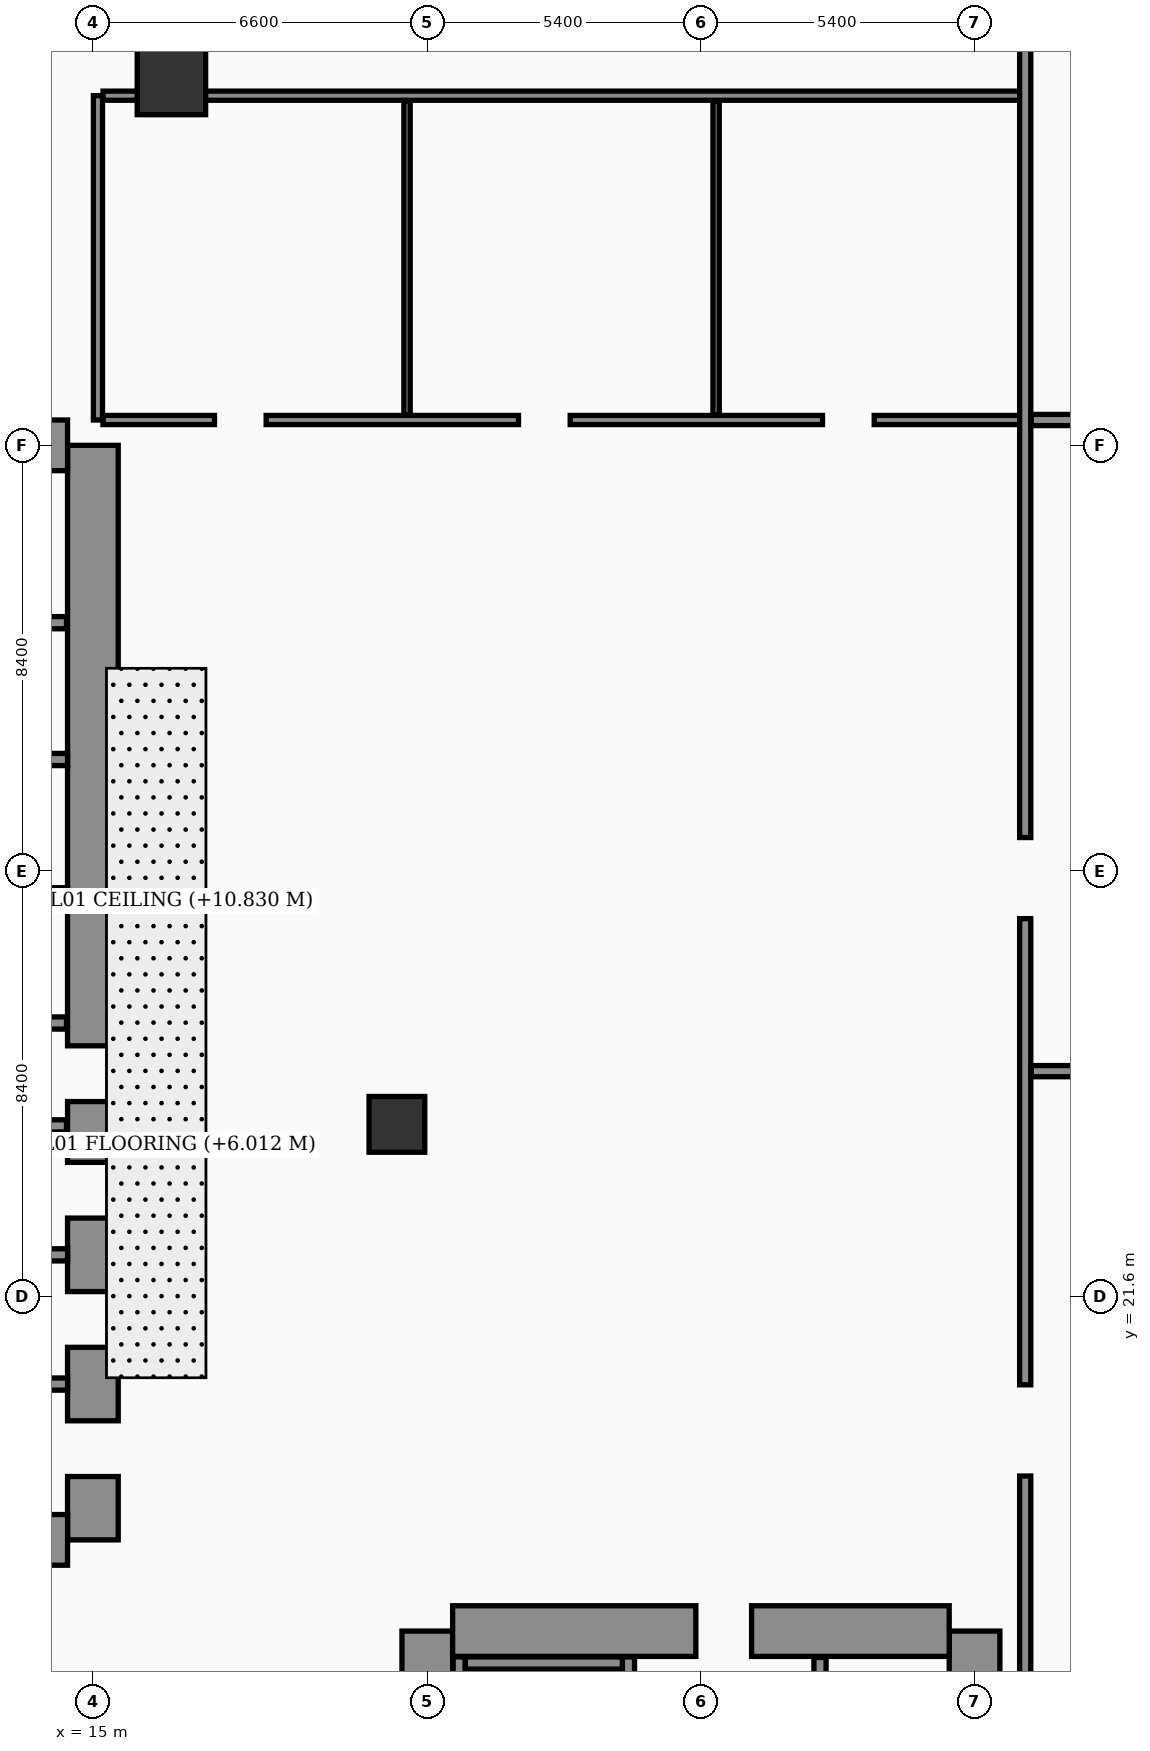
"""IFC4 building model, lengths in metres.
Left out: names, types, materials, properties, quantities, classifications, styles, units other than length and angle.
Written with IfcOpenShell. Run it as: python <this file> out.ifc"""

import sys

from ifc_helpers import new_model, si_unit, direction, frame, frame_2d, origin, origin_2d, place, context, subcontext, project, spatial, rectangle, hollow_rectangle, extrude, element, fill, save


model = new_model("IFC4")
c1 = context("Model", 3, precision=1e-05, world=origin(), true_north=direction((0.0, 1.0)))
c2 = subcontext(c1, "Body", "Model", "MODEL_VIEW")
j1 = project(units=[si_unit("LENGTHUNIT", "METRE"), si_unit("PLANEANGLEUNIT", "RADIAN")], contexts=[c1])
p1 = place(None, origin())
s1 = spatial("IfcSite", under=j1, at=p1, CompositionType="ELEMENT")
p2 = place(p1, origin())
s2 = spatial("IfcBuilding", under=s1, at=p2, CompositionType="ELEMENT")
p3 = place(p2, frame((0.0, 0.0, 6.0)))
s3 = spatial("IfcBuildingStorey", under=s2, at=p3, CompositionType="ELEMENT", Elevation=6.0)
p4 = place(p3, frame((15.0, 16.8, 0.0), z_axis=(0.0, 0.0, 1.0), x_axis=(0.0, 1.0, 0.0)))
e1 = element("IfcWall", 1, at=p4, inside=s3, PredefinedType="SHEAR", context=c2, shape_type="SweptSolid", body=[
    extrude(rectangle(XDim=21.6, YDim=1.0, at=frame_2d((10.8, 0.0))), origin(), (0.0, 0.0, 1.0), 5.68),
])
p5 = place(p4, frame((8.65, 0.0, 0.0)))
e2 = element("IfcOpeningElement", 2, at=p5, cuts=e1, PredefinedType="OPENING", context=c2, shape_type="SweptSolid", body=[
    extrude(rectangle(XDim=1.1, YDim=2.2, at=frame_2d((0.55, 1.1))), frame((0.0, 0.51, 0.0), z_axis=(0.0, -1.0, 0.0), x_axis=(1.0, 0.0, 0.0)), (0.0, 0.0, 1.0), 1.02),
])
p6 = place(p4, frame((1.25, 0.0, 0.0)))
e3 = element("IfcOpeningElement", 3, at=p6, cuts=e1, PredefinedType="OPENING", context=c2, shape_type="SweptSolid", body=[
    extrude(rectangle(XDim=1.1, YDim=2.2, at=frame_2d((0.55, 1.1))), frame((0.0, 0.51, 0.0), z_axis=(0.0, -1.0, 0.0), x_axis=(1.0, 0.0, 0.0)), (0.0, 0.0, 1.0), 1.02),
])
p7 = place(p4, frame((3.8, 0.0, 0.0)))
e4 = element("IfcOpeningElement", 4, at=p7, cuts=e1, PredefinedType="OPENING", context=c2, shape_type="SweptSolid", body=[
    extrude(rectangle(XDim=1.1, YDim=2.2, at=frame_2d((0.55, 1.1))), frame((0.0, 0.51, 0.0), z_axis=(0.0, -1.0, 0.0), x_axis=(1.0, 0.0, 0.0)), (0.0, 0.0, 1.0), 1.02),
])
p8 = place(p4, frame((6.35, 0.0, 0.0)))
e5 = element("IfcOpeningElement", 5, at=p8, cuts=e1, PredefinedType="OPENING", context=c2, shape_type="SweptSolid", body=[
    extrude(rectangle(XDim=1.1, YDim=2.2, at=frame_2d((0.55, 1.1))), frame((0.0, 0.51, 0.0), z_axis=(0.0, -1.0, 0.0), x_axis=(1.0, 0.0, 0.0)), (0.0, 0.0, 1.0), 1.02),
])
for number, where, z_axis, x_axis in (
    (6, (4.7, 38.4, 0.0), (0.0, 0.0, 1.0), (1.0, 0.0, 0.0)),
    (7, (4.7, 16.8, 0.0), (0.0, 0.0, 1.0), (1.0, 0.0, 0.0)),
):
    element("IfcWall", number, at=place(p3, frame(where, z_axis=z_axis, x_axis=x_axis)), inside=s3, PredefinedType="SHEAR", context=c2, shape_type="SweptSolid", body=[
        extrude(rectangle(XDim=9.8, YDim=1.0, at=frame_2d((4.9, 0.0))), origin(), (0.0, 0.0, 1.0), 5.68),
    ])
for number, where, z_axis, x_axis in (
    (8, (21.6, 4.6, 0.0), (0.0, 0.0, 1.0), (0.0, 1.0, 0.0)),
    (9, (32.4, 4.6, 0.0), (0.0, 0.0, 1.0), (0.0, 1.0, 0.0)),
):
    element("IfcWall", number, at=place(p3, frame(where, z_axis=z_axis, x_axis=x_axis)), inside=s3, PredefinedType="SHEAR", context=c2, shape_type="SweptSolid", body=[
        extrude(rectangle(XDim=10.4, YDim=1.0, at=frame_2d((5.2, 0.0))), origin(), (0.0, 0.0, 1.0), 5.68),
    ])
p9 = place(p3, frame((22.1, 15.0, 0.0), z_axis=(0.0, 0.0, 1.0), x_axis=(1.0, 0.0, 0.0)))
e10 = element("IfcWall", 10, at=p9, inside=s3, PredefinedType="SHEAR", context=c2, shape_type="SweptSolid", body=[
    extrude(rectangle(XDim=9.8, YDim=1.0, at=frame_2d((4.9, 0.0))), origin(), (0.0, 0.0, 1.0), 5.68),
])
p10 = place(p9, frame((4.8, 0.0, 0.0)))
e11 = element("IfcOpeningElement", 11, at=p10, cuts=e10, PredefinedType="OPENING", context=c2, shape_type="SweptSolid", body=[
    extrude(rectangle(XDim=1.1, YDim=2.2, at=frame_2d((0.55, 1.1))), frame((0.0, 0.51, 0.0), z_axis=(0.0, -1.0, 0.0), x_axis=(1.0, 0.0, 0.0)), (0.0, 0.0, 1.0), 1.02),
])
p11 = place(p3, frame((22.23, 5.1, 0.0), z_axis=(0.0, 0.0, 1.0), x_axis=(0.0, 1.0, 0.0)))
e12 = element("IfcWall", 12, at=p11, inside=s3, PredefinedType="SOLIDWALL", context=c2, shape_type="SweptSolid", body=[
    extrude(rectangle(XDim=9.39, YDim=0.24, at=frame_2d((4.695, 0.0))), origin(), (0.0, 0.0, 1.0), 5.68),
])
p12 = place(p3, frame((25.57, 5.1, 0.0), z_axis=(0.0, 0.0, 1.0), x_axis=(0.0, 1.0, 0.0)))
e13 = element("IfcWall", 13, at=p12, inside=s3, PredefinedType="SOLIDWALL", context=c2, shape_type="SweptSolid", body=[
    extrude(rectangle(XDim=9.39, YDim=0.24, at=frame_2d((4.695, 0.0))), origin(), (0.0, 0.0, 1.0), 5.68),
])
p13 = place(p12, frame((0.35, 0.0, 0.0)))
e14 = element("IfcOpeningElement", 14, at=p13, cuts=e13, PredefinedType="OPENING", context=c2, shape_type="SweptSolid", body=[
    extrude(rectangle(XDim=1.15, YDim=2.2, at=frame_2d((0.575, 1.1))), frame((0.0, 0.13, 0.0), z_axis=(0.0, -1.0, 0.0), x_axis=(1.0, 0.0, 0.0)), (0.0, 0.0, 1.0), 0.26),
])
p14 = place(p3, frame((22.35, 14.37, 0.0), z_axis=(0.0, 0.0, 1.0), x_axis=(1.0, 0.0, 0.0)))
e15 = element("IfcWall", 15, at=p14, inside=s3, PredefinedType="SOLIDWALL", context=c2, shape_type="SweptSolid", body=[
    extrude(rectangle(XDim=3.1, YDim=0.24, at=frame_2d((1.55, 0.0))), origin(), (0.0, 0.0, 1.0), 5.68),
])
for number, where, z_axis, x_axis in (
    (16, (12.18, 19.875, 0.0), (0.0, 0.0, 1.0), (1.0, 0.0, 0.0)),
    (17, (12.18, 22.425, 0.0), (0.0, 0.0, 1.0), (1.0, 0.0, 0.0)),
    (18, (12.18, 29.55, 0.0), (0.0, 0.0, 1.0), (1.0, 0.0, 0.0)),
    (19, (12.18, 32.2, 0.0), (0.0, 0.0, 1.0), (1.0, 0.0, 0.0)),
):
    element("IfcWall", number, at=place(p3, frame(where, z_axis=z_axis, x_axis=x_axis)), inside=s3, PredefinedType="SOLIDWALL", context=c2, shape_type="SweptSolid", body=[
        extrude(rectangle(XDim=2.32, YDim=0.24, at=frame_2d((1.16, 0.0))), origin(), (0.0, 0.0, 1.0), 5.68),
    ])
p15 = place(p3, frame((16.55, 45.6, 0.0), z_axis=(0.0, 0.0, 1.0), x_axis=(1.0, 0.0, 0.0)))
e20 = element("IfcColumn", 20, at=p15, inside=s3, PredefinedType="COLUMN", context=c2, shape_type="SweptSolid", body=[
    extrude(rectangle(XDim=1.35, YDim=1.35, at=origin_2d()), origin(), (0.0, 0.0, 1.0), 5.68),
])
p16 = place(p3, frame((21.0, 25.0, 0.0), z_axis=(0.0, 0.0, 1.0), x_axis=(1.0, 0.0, 0.0)))
e21 = element("IfcColumn", 21, at=p16, inside=s3, PredefinedType="COLUMN", context=c2, shape_type="SweptSolid", body=[
    extrude(hollow_rectangle(XDim=1.1, YDim=1.1, WallThickness=0.045, at=origin_2d()), origin(), (0.0, 0.0, 1.0), 5.68),
])
p17 = place(p3, frame((12.15, 24.97, 0.0), z_axis=(0.0, 0.0, 1.0), x_axis=(1.0, 0.0, 0.0)))
e22 = element("IfcWall", 22, at=p17, inside=s3, PredefinedType="SOLIDWALL", context=c2, shape_type="SweptSolid", body=[
    extrude(rectangle(XDim=2.33, YDim=0.24, at=frame_2d((1.165, 0.0))), origin(), (0.0, 0.0, 1.0), 4.88),
])
p18 = place(p3, frame((12.25, 27.0, 0.0), z_axis=(0.0, 0.0, 1.0), x_axis=(1.0, 0.0, 0.0)))
e23 = element("IfcWall", 23, at=p18, inside=s3, PredefinedType="SOLIDWALL", context=c2, shape_type="SweptSolid", body=[
    extrude(rectangle(XDim=2.23, YDim=0.24, at=frame_2d((1.115, 0.0))), origin(), (0.0, 0.0, 1.0), 5.68),
])
p19 = place(p3, frame((9.66, 34.9, 0.0), z_axis=(0.0, 0.0, 1.0), x_axis=(1.0, 0.0, 0.0)))
e24 = element("IfcWall", 24, at=p19, inside=s3, PredefinedType="SOLIDWALL", context=c2, shape_type="SweptSolid", body=[
    extrude(rectangle(XDim=4.82, YDim=0.24, at=frame_2d((2.41, 0.0))), origin(), (0.0, 0.0, 1.0), 5.68),
])
p20 = place(p3, frame((29.35, 5.12, 0.0), z_axis=(0.0, 0.0, 1.0), x_axis=(0.0, 1.0, 0.0)))
e25 = element("IfcWall", 25, at=p20, inside=s3, PredefinedType="SOLIDWALL", context=c2, shape_type="SweptSolid", body=[
    extrude(rectangle(XDim=9.36, YDim=0.24, at=frame_2d((4.68, 0.0))), origin(), (0.0, 0.0, 1.0), 5.68),
])
p21 = place(p20, frame((0.55, 0.0, 0.0)))
e26 = element("IfcOpeningElement", 26, at=p21, cuts=e25, PredefinedType="OPENING", context=c2, shape_type="SweptSolid", body=[
    extrude(rectangle(XDim=1.3, YDim=2.35, at=frame_2d((0.65, 1.175))), frame((0.0, 0.13, 0.0), z_axis=(0.0, -1.0, 0.0), x_axis=(1.0, 0.0, 0.0)), (0.0, 0.0, 1.0), 0.26),
])
p22 = place(p3, frame((15.2, 38.9, 0.0), z_axis=(0.0, 0.0, 1.0), x_axis=(1.0, 0.0, 0.0)))
e27 = element("IfcWall", 27, at=p22, inside=s3, PredefinedType="PARTITIONING", context=c2, shape_type="SweptSolid", body=[
    extrude(rectangle(XDim=18.1, YDim=0.18, at=frame_2d((9.05, 0.0))), origin(), (0.0, 0.0, 1.0), 4.88),
])
p23 = place(p22, frame((2.2, 0.0, 0.0)))
e28 = element("IfcOpeningElement", 28, at=p23, cuts=e27, PredefinedType="OPENING", context=c2, shape_type="SweptSolid", body=[
    extrude(rectangle(XDim=1.02, YDim=2.2, at=frame_2d((0.51, 1.1))), frame((0.0, 0.1, 0.0), z_axis=(0.0, -1.0, 0.0), x_axis=(1.0, 0.0, 0.0)), (0.0, 0.0, 1.0), 0.2),
])
p24 = place(p22, frame((8.2, 0.0, 0.0)))
e29 = element("IfcOpeningElement", 29, at=p24, cuts=e27, PredefinedType="OPENING", context=c2, shape_type="SweptSolid", body=[
    extrude(rectangle(XDim=1.02, YDim=2.2, at=frame_2d((0.51, 1.1))), frame((0.0, 0.1, 0.0), z_axis=(0.0, -1.0, 0.0), x_axis=(1.0, 0.0, 0.0)), (0.0, 0.0, 1.0), 0.2),
])
p25 = place(p22, frame((14.2, 0.0, 0.0)))
e30 = element("IfcOpeningElement", 30, at=p25, cuts=e27, PredefinedType="OPENING", context=c2, shape_type="SweptSolid", body=[
    extrude(rectangle(XDim=1.02, YDim=2.2, at=frame_2d((0.51, 1.1))), frame((0.0, 0.1, 0.0), z_axis=(0.0, -1.0, 0.0), x_axis=(1.0, 0.0, 0.0)), (0.0, 0.0, 1.0), 0.2),
])
p26 = place(p3, frame((15.2, 45.3, 0.0), z_axis=(0.0, 0.0, 1.0), x_axis=(1.0, 0.0, 0.0)))
e31 = element("IfcWall", 31, at=p26, inside=s3, PredefinedType="PARTITIONING", context=c2, shape_type="SweptSolid", body=[
    extrude(rectangle(XDim=18.1, YDim=0.18, at=frame_2d((9.05, 0.0))), origin(), (0.0, 0.0, 1.0), 4.88),
])
p27 = place(p3, frame((15.1, 38.9, 0.0), z_axis=(0.0, 0.0, 1.0), x_axis=(0.0, 1.0, 0.0)))
e32 = element("IfcWall", 32, at=p27, inside=s3, PredefinedType="PARTITIONING", context=c2, shape_type="SweptSolid", body=[
    extrude(rectangle(XDim=6.4, YDim=0.18, at=frame_2d((3.2, 0.0))), origin(), (0.0, 0.0, 1.0), 4.88),
])
p28 = place(p3, frame((21.2, 39.0, 0.0), z_axis=(0.0, 0.0, 1.0), x_axis=(0.0, 1.0, 0.0)))
e33 = element("IfcWall", 33, at=p28, inside=s3, PredefinedType="PARTITIONING", context=c2, shape_type="SweptSolid", body=[
    extrude(rectangle(XDim=6.2, YDim=0.125, at=frame_2d((3.1, 0.0))), origin(), (0.0, 0.0, 1.0), 4.88),
])
p29 = place(p3, frame((27.3, 39.0, 0.0), z_axis=(0.0, 0.0, 1.0), x_axis=(0.0, 1.0, 0.0)))
e34 = element("IfcWall", 34, at=p29, inside=s3, PredefinedType="PARTITIONING", context=c2, shape_type="SweptSolid", body=[
    extrude(rectangle(XDim=6.2, YDim=0.125, at=frame_2d((3.1, 0.0))), origin(), (0.0, 0.0, 1.0), 5.68),
])
p30 = place(p3, frame((33.4, 0.06, 0.0), z_axis=(0.0, 0.0, 1.0), x_axis=(0.0, 1.0, 0.0)))
e35 = element("IfcWall", 35, at=p30, inside=s3, PredefinedType="SOLIDWALL", context=c2, shape_type="SweptSolid", body=[
    extrude(rectangle(XDim=57.88, YDim=0.22, at=frame_2d((28.94, 0.0))), origin(), (0.0, 0.0, 1.0), 4.88),
])
p31 = place(p30, frame((18.0, 0.0, 0.0)))
e36 = element("IfcOpeningElement", 36, at=p31, cuts=e35, PredefinedType="OPENING", context=c2, shape_type="SweptSolid", body=[
    extrude(rectangle(XDim=1.8, YDim=2.4, at=frame_2d((0.9, 1.2))), frame((0.0, 0.12, 0.0), z_axis=(0.0, -1.0, 0.0), x_axis=(1.0, 0.0, 0.0)), (0.0, 0.0, 1.0), 0.24),
])
p32 = place(p30, frame((29.0, 0.0, 0.0)))
e37 = element("IfcOpeningElement", 37, at=p32, cuts=e35, PredefinedType="OPENING", context=c2, shape_type="SweptSolid", body=[
    extrude(rectangle(XDim=1.6, YDim=2.35, at=frame_2d((0.8, 1.175))), frame((0.0, 0.12, 0.0), z_axis=(0.0, -1.0, 0.0), x_axis=(1.0, 0.0, 0.0)), (0.0, 0.0, 1.0), 0.24),
])
p33 = place(p30, frame((49.0, 0.0, 0.0)))
e38 = element("IfcOpeningElement", 38, at=p33, cuts=e35, PredefinedType="OPENING", context=c2, shape_type="SweptSolid", body=[
    extrude(rectangle(XDim=1.5, YDim=2.22, at=frame_2d((0.75, 1.11))), frame((0.0, 0.12, 0.0), z_axis=(0.0, -1.0, 0.0), x_axis=(1.0, 0.0, 0.0)), (0.0, 0.0, 1.0), 0.24),
])
p34 = place(p3, frame((33.52, 26.05, 0.0), z_axis=(0.0, 0.0, 1.0), x_axis=(1.0, 0.0, 0.0)))
e39 = element("IfcWall", 39, at=p34, inside=s3, PredefinedType="SOLIDWALL", context=c2, shape_type="SweptSolid", body=[
    extrude(rectangle(XDim=50.42, YDim=0.22, at=frame_2d((25.21, 0.0))), origin(), (0.0, 0.0, 1.0), 4.18),
])
p35 = place(p3, frame((33.52, 38.9, 0.0), z_axis=(0.0, 0.0, 1.0), x_axis=(1.0, 0.0, 0.0)))
e40 = element("IfcWall", 40, at=p35, inside=s3, PredefinedType="SOLIDWALL", context=c2, shape_type="SweptSolid", body=[
    extrude(rectangle(XDim=50.42, YDim=0.22, at=frame_2d((25.21, 0.0))), origin(), (0.0, 0.0, 1.0), 4.88),
])
p36 = place(p35, frame((15.0, 0.0, 0.0)))
e41 = element("IfcOpeningElement", 41, at=p36, cuts=e40, PredefinedType="OPENING", context=c2, shape_type="SweptSolid", body=[
    extrude(rectangle(XDim=1.6, YDim=2.35, at=frame_2d((0.8, 1.175))), frame((0.0, 0.12, 0.0), z_axis=(0.0, -1.0, 0.0), x_axis=(1.0, 0.0, 0.0)), (0.0, 0.0, 1.0), 0.24),
])
p37 = place(p23, origin())
e42 = element("IfcDoor", 42, at=p37, inside=s3, OperationType="SINGLE_SWING_LEFT", PredefinedType="DOOR", context=c2, shape_type="SweptSolid", body=[
    extrude(rectangle(XDim=1.02, YDim=2.2, at=frame_2d((0.51, 1.1))), frame((0.0, 0.025, 0.0), z_axis=(0.0, -1.0, 0.0), x_axis=(1.0, 0.0, 0.0)), (0.0, 0.0, 1.0), 0.05),
])
fill(e28, e42)
p38 = place(p24, origin())
e43 = element("IfcDoor", 43, at=p38, inside=s3, OperationType="SINGLE_SWING_RIGHT", PredefinedType="DOOR", context=c2, shape_type="SweptSolid", body=[
    extrude(rectangle(XDim=1.02, YDim=2.2, at=frame_2d((0.51, 1.1))), frame((0.0, 0.025, 0.0), z_axis=(0.0, -1.0, 0.0), x_axis=(1.0, 0.0, 0.0)), (0.0, 0.0, 1.0), 0.05),
])
fill(e29, e43)
p39 = place(p25, origin())
e44 = element("IfcDoor", 44, at=p39, inside=s3, OperationType="SINGLE_SWING_LEFT", PredefinedType="DOOR", context=c2, shape_type="SweptSolid", body=[
    extrude(rectangle(XDim=1.02, YDim=2.2, at=frame_2d((0.51, 1.1))), frame((0.0, 0.025, 0.0), z_axis=(0.0, -1.0, 0.0), x_axis=(1.0, 0.0, 0.0)), (0.0, 0.0, 1.0), 0.05),
])
fill(e30, e44)
p40 = place(p31, origin())
e45 = element("IfcDoor", 45, at=p40, inside=s3, OperationType="SINGLE_SWING_LEFT", PredefinedType="DOOR", context=c2, shape_type="SweptSolid", body=[
    extrude(rectangle(XDim=1.8, YDim=2.4, at=frame_2d((0.9, 1.2))), frame((0.0, 0.025, 0.0), z_axis=(0.0, -1.0, 0.0), x_axis=(1.0, 0.0, 0.0)), (0.0, 0.0, 1.0), 0.05),
])
fill(e36, e45)
p41 = place(p32, origin())
e46 = element("IfcDoor", 46, at=p41, inside=s3, OperationType="SINGLE_SWING_RIGHT", PredefinedType="DOOR", context=c2, shape_type="SweptSolid", body=[
    extrude(rectangle(XDim=1.6, YDim=2.35, at=frame_2d((0.8, 1.175))), frame((0.0, 0.025, 0.0), z_axis=(0.0, -1.0, 0.0), x_axis=(1.0, 0.0, 0.0)), (0.0, 0.0, 1.0), 0.05),
])
fill(e37, e46)
p42 = place(p5, origin())
e47 = element("IfcDoor", 47, at=p42, inside=s3, OperationType="SINGLE_SWING_RIGHT", PredefinedType="DOOR", context=c2, shape_type="SweptSolid", body=[
    extrude(rectangle(XDim=1.1, YDim=2.2, at=frame_2d((0.55, 1.1))), frame((0.0, 0.025, 0.0), z_axis=(0.0, -1.0, 0.0), x_axis=(1.0, 0.0, 0.0)), (0.0, 0.0, 1.0), 0.05),
])
fill(e2, e47)
p43 = place(p6, origin())
e48 = element("IfcDoor", 48, at=p43, inside=s3, OperationType="DOUBLE_DOOR_SLIDING", PredefinedType="DOOR", context=c2, shape_type="SweptSolid", body=[
    extrude(rectangle(XDim=1.1, YDim=2.2, at=frame_2d((0.55, 1.1))), frame((0.0, 0.025, 0.0), z_axis=(0.0, -1.0, 0.0), x_axis=(1.0, 0.0, 0.0)), (0.0, 0.0, 1.0), 0.05),
])
fill(e3, e48)
p44 = place(p7, origin())
e49 = element("IfcDoor", 49, at=p44, inside=s3, OperationType="DOUBLE_DOOR_SLIDING", PredefinedType="DOOR", context=c2, shape_type="SweptSolid", body=[
    extrude(rectangle(XDim=1.1, YDim=2.2, at=frame_2d((0.55, 1.1))), frame((0.0, 0.025, 0.0), z_axis=(0.0, -1.0, 0.0), x_axis=(1.0, 0.0, 0.0)), (0.0, 0.0, 1.0), 0.05),
])
fill(e4, e49)
p45 = place(p8, origin())
e50 = element("IfcDoor", 50, at=p45, inside=s3, OperationType="DOUBLE_DOOR_SLIDING", PredefinedType="DOOR", context=c2, shape_type="SweptSolid", body=[
    extrude(rectangle(XDim=1.1, YDim=2.2, at=frame_2d((0.55, 1.1))), frame((0.0, 0.025, 0.0), z_axis=(0.0, -1.0, 0.0), x_axis=(1.0, 0.0, 0.0)), (0.0, 0.0, 1.0), 0.05),
])
fill(e5, e50)
p46 = place(p10, origin())
e51 = element("IfcDoor", 51, at=p46, inside=s3, OperationType="SINGLE_SWING_LEFT", PredefinedType="DOOR", context=c2, shape_type="SweptSolid", body=[
    extrude(rectangle(XDim=1.1, YDim=2.2, at=frame_2d((0.55, 1.1))), frame((0.0, 0.025, 0.0), z_axis=(0.0, -1.0, 0.0), x_axis=(1.0, 0.0, 0.0)), (0.0, 0.0, 1.0), 0.05),
])
fill(e11, e51)
save(model, sys.argv[1])
